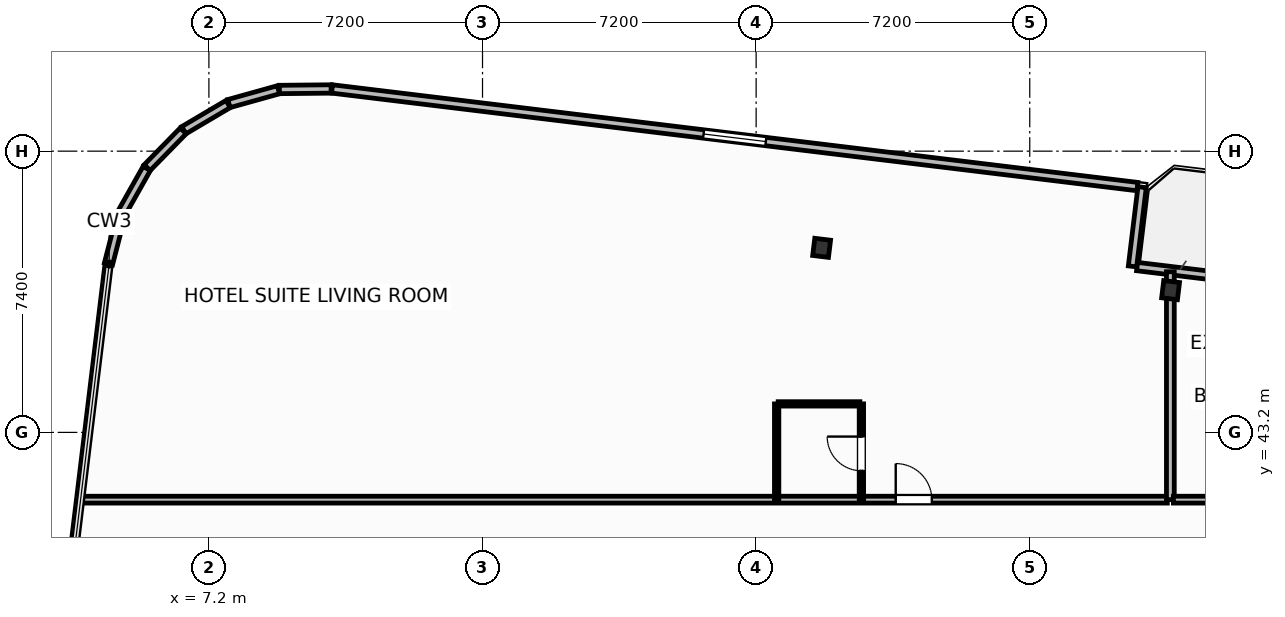
"""IFC4 building model, lengths in metres.
Left out: names, types, materials, properties, quantities, classifications, styles, units other than length and angle.
Written with IfcOpenShell. Run it as: python <this file> out.ifc"""

import sys

from ifc_helpers import new_model, si_unit, direction, frame, frame_2d, origin, origin_2d, place, context, subcontext, project, spatial, rectangle, i_section, extrude, element, fill, save


model = new_model("IFC4")
c1 = context("Model", 3, precision=1e-05, world=origin(), true_north=direction((0.0, 1.0)))
c2 = subcontext(c1, "Body", "Model", "MODEL_VIEW")
j1 = project(units=[si_unit("LENGTHUNIT", "METRE"), si_unit("PLANEANGLEUNIT", "RADIAN")], contexts=[c1])
p1 = place(None, origin())
s1 = spatial("IfcSite", under=j1, at=p1, CompositionType="ELEMENT")
p2 = place(p1, origin())
s2 = spatial("IfcBuilding", under=s1, at=p2, CompositionType="ELEMENT")
p3 = place(p2, frame((0.0, 0.0, 125.4)))
s3 = spatial("IfcBuildingStorey", under=s2, at=p3, CompositionType="ELEMENT", Elevation=125.4)
for number, where, z_axis, x_axis in (
    (1, (32.506, 46.943, 0.0), (0.0, 0.0, 1.0), (0.993, -0.12, 0.0)),
    (2, (23.323, 48.056, 0.0), (0.0, 0.0, 1.0), (0.993, -0.12, 0.0)),
):
    element("IfcColumn", number, at=place(p3, frame(where, z_axis=z_axis, x_axis=x_axis)), inside=s3, PredefinedType="COLUMN", context=c2, shape_type="SweptSolid", body=[
        extrude(i_section(OverallWidth=0.418, OverallDepth=0.455, WebThickness=0.042, FlangeThickness=0.068, FilletRadius=0.025, at=origin_2d()), origin(), (0.0, 0.0, 1.0), 3.7),
    ])
p4 = place(p3, frame((31.624, 47.563, 0.0), z_axis=(0.0, 0.0, 1.0), x_axis=(0.992729951822, -0.120362962556, 0.0)))
e3 = element("IfcWall", 3, at=p4, inside=s3, PredefinedType="SOLIDWALL", context=c2, shape_type="SweptSolid", body=[
    extrude(rectangle(XDim=6.0, YDim=0.22, at=frame_2d((3.0, 0.0))), origin(), (0.0, 0.0, 1.0), 2.73),
])
p5 = place(p4, frame((2.176, 0.0, 0.0)))
e4 = element("IfcOpeningElement", 4, at=p5, cuts=e3, PredefinedType="OPENING", context=c2, shape_type="SweptSolid", body=[
    extrude(rectangle(XDim=1.5, YDim=2.25, at=frame_2d((0.75, 1.125))), frame((0.0, 0.12, 0.0), z_axis=(0.0, -1.0, 0.0), x_axis=(1.0, 0.0, 0.0)), (0.0, 0.0, 1.0), 0.24),
])
p6 = place(p3, frame((31.504, 47.568, 0.0), z_axis=(0.0, 0.0, 1.0), x_axis=(0.120341784665, 0.992732519294, 0.0)))
e5 = element("IfcWall", 5, at=p6, inside=s3, PredefinedType="SOLIDWALL", context=c2, shape_type="SweptSolid", body=[
    extrude(rectangle(XDim=2.1, YDim=0.22, at=frame_2d((1.05, 0.0))), origin(), (0.0, 0.0, 1.0), 2.73),
])
p7 = place(p3, frame((31.633, 49.668, 0.0), z_axis=(0.0, 0.0, 1.0), x_axis=(-0.992731670483, 0.120348786531, 0.0)))
e6 = element("IfcWall", 6, at=p7, inside=s3, PredefinedType="SOLIDWALL", context=c2, shape_type="SweptSolid", body=[
    extrude(rectangle(XDim=21.347, YDim=0.22, at=frame_2d((10.674, 0.0))), origin(), (0.0, 0.0, 1.0), 2.73),
])
p8 = place(p7, frame((9.849, 0.0, 0.8)))
e7 = element("IfcOpeningElement", 7, at=p8, cuts=e6, PredefinedType="OPENING", context=c2, shape_type="SweptSolid", body=[
    extrude(rectangle(XDim=1.65, YDim=1.65, at=frame_2d((0.825, 0.825))), frame((0.0, 0.12, 0.0), z_axis=(0.0, -1.0, 0.0), x_axis=(1.0, 0.0, 0.0)), (0.0, 0.0, 1.0), 0.24),
])
p9 = place(p3, frame((10.416, 52.237, 0.0), z_axis=(0.0, 0.0, 1.0), x_axis=(-0.999947718056, -0.010225514878, 0.0)))
e8 = element("IfcWall", 8, at=p9, inside=s3, PredefinedType="SOLIDWALL", context=c2, shape_type="SweptSolid", body=[
    extrude(rectangle(XDim=1.361, YDim=0.22, at=frame_2d((0.68, 0.0))), origin(), (0.0, 0.0, 1.0), 2.73),
])
for number, where, z_axis, x_axis in (
    (9, (9.031, 52.216, 0.0), (0.0, 0.0, 1.0), (-0.963, -0.269, 0.0)),
    (10, (7.706, 51.84, 0.0), (0.0, 0.0, 1.0), (-0.861, -0.509, 0.0)),
):
    element("IfcWall", number, at=place(p3, frame(where, z_axis=z_axis, x_axis=x_axis)), inside=s3, PredefinedType="SOLIDWALL", context=c2, shape_type="SweptSolid", body=[
        extrude(rectangle(XDim=1.353, YDim=0.22, at=frame_2d((0.677, 0.0))), origin(), (0.0, 0.0, 1.0), 2.73),
    ])
p10 = place(p3, frame((6.523, 51.133, 0.0), z_axis=(0.0, 0.0, 1.0), x_axis=(-0.699762925925, -0.714375144795, 0.0)))
e11 = element("IfcWall", 11, at=p10, inside=s3, PredefinedType="SOLIDWALL", context=c2, shape_type="SweptSolid", body=[
    extrude(rectangle(XDim=1.353, YDim=0.22, at=frame_2d((0.677, 0.0))), origin(), (0.0, 0.0, 1.0), 2.73),
])
p11 = place(p3, frame((5.564, 50.145, 0.0), z_axis=(0.0, 0.0, 1.0), x_axis=(-0.491117621399, -0.871093268227, 0.0)))
e12 = element("IfcWall", 12, at=p11, inside=s3, PredefinedType="SOLIDWALL", context=c2, shape_type="SweptSolid", body=[
    extrude(rectangle(XDim=1.353, YDim=0.22, at=frame_2d((0.677, 0.0))), origin(), (0.0, 0.0, 1.0), 2.73),
])
p12 = place(p3, frame((4.894, 48.942, 0.0), z_axis=(0.0, 0.0, 1.0), x_axis=(-0.248857256909, -0.968540172468, 0.0)))
e13 = element("IfcWall", 13, at=p12, inside=s3, PredefinedType="SOLIDWALL", context=c2, shape_type="SweptSolid", body=[
    extrude(rectangle(XDim=1.353, YDim=0.22, at=frame_2d((0.676, 0.0))), origin(), (0.0, 0.0, 1.0), 2.73),
])
p13 = place(p3, frame((3.864, 41.43, 0.0), z_axis=(0.0, 0.0, 1.0), x_axis=(1.0, 0.0, 0.0)))
e14 = element("IfcWall", 14, at=p13, inside=s3, PredefinedType="PARTITIONING", context=c2, shape_type="SweptSolid", body=[
    extrude(rectangle(XDim=28.556, YDim=0.18, at=frame_2d((14.278, 0.0))), origin(), (0.0, 0.0, 1.0), 3.45),
])
p14 = place(p13, frame((21.409, 0.0, 0.0)))
e15 = element("IfcOpeningElement", 15, at=p14, cuts=e14, PredefinedType="OPENING", context=c2, shape_type="SweptSolid", body=[
    extrude(rectangle(XDim=0.95, YDim=2.15, at=frame_2d((0.475, 1.075))), frame((0.0, 0.1, 0.0), z_axis=(0.0, -1.0, 0.0), x_axis=(1.0, 0.0, 0.0)), (0.0, 0.0, 1.0), 0.2),
])
p15 = place(p3, frame((22.18, 43.95, 0.0), z_axis=(0.0, 0.0, 1.0), x_axis=(1.0, 0.0, 0.0)))
e16 = element("IfcWall", 16, at=p15, inside=s3, PredefinedType="PARTITIONING", context=c2, shape_type="SweptSolid", body=[
    extrude(rectangle(XDim=2.15, YDim=0.115, at=frame_2d((1.075, 0.0))), origin(), (0.0, 0.0, 1.0), 3.45),
])
p16 = place(p3, frame((24.37, 41.43, 0.0), z_axis=(0.0, 0.0, 1.0), x_axis=(0.0, 1.0, 0.0)))
e17 = element("IfcWall", 17, at=p16, inside=s3, PredefinedType="PARTITIONING", context=c2, shape_type="SweptSolid", body=[
    extrude(rectangle(XDim=2.52, YDim=0.115, at=frame_2d((1.26, 0.0))), origin(), (0.0, 0.0, 1.0), 3.45),
])
p17 = place(p16, frame((0.76, 0.0, 0.0)))
e18 = element("IfcOpeningElement", 18, at=p17, cuts=e17, PredefinedType="OPENING", context=c2, shape_type="SweptSolid", body=[
    extrude(rectangle(XDim=0.9, YDim=2.05, at=frame_2d((0.45, 1.025))), frame((0.0, 0.067, 0.0), z_axis=(0.0, -1.0, 0.0), x_axis=(1.0, 0.0, 0.0)), (0.0, 0.0, 1.0), 0.135),
])
p18 = place(p3, frame((22.14, 41.43, 0.0), z_axis=(0.0, 0.0, 1.0), x_axis=(0.0, 1.0, 0.0)))
e19 = element("IfcWall", 19, at=p18, inside=s3, PredefinedType="PARTITIONING", context=c2, shape_type="SweptSolid", body=[
    extrude(rectangle(XDim=2.52, YDim=0.115, at=frame_2d((1.26, 0.0))), origin(), (0.0, 0.0, 1.0), 3.45),
])
p19 = place(p3, frame((32.5, 41.43, 0.0), z_axis=(0.0, 0.0, 1.0), x_axis=(0.0, 1.0, 0.0)))
e20 = element("IfcWall", 20, at=p19, inside=s3, PredefinedType="PARTITIONING", context=c2, shape_type="SweptSolid", body=[
    extrude(rectangle(XDim=5.997, YDim=0.205, at=frame_2d((2.999, 0.0))), origin(), (0.0, 0.0, 1.0), 2.662),
])
p20 = place(p3, frame((32.58, 41.43, 0.0), z_axis=(0.0, 0.0, 1.0), x_axis=(1.0, 0.0, 0.0)))
e21 = element("IfcWall", 21, at=p20, inside=s3, PredefinedType="PARTITIONING", context=c2, shape_type="SweptSolid", body=[
    extrude(rectangle(XDim=9.84, YDim=0.18, at=frame_2d((4.92, 0.0))), origin(), (0.0, 0.0, 1.0), 3.45),
])
p21 = place(p20, frame((5.68, 0.0, 0.0)))
e22 = element("IfcOpeningElement", 22, at=p21, cuts=e21, PredefinedType="OPENING", context=c2, shape_type="SweptSolid", body=[
    extrude(rectangle(XDim=0.95, YDim=2.15, at=frame_2d((0.475, 1.075))), frame((0.0, 0.1, 0.0), z_axis=(0.0, -1.0, 0.0), x_axis=(1.0, 0.0, 0.0)), (0.0, 0.0, 1.0), 0.2),
])
p22 = place(p8, origin())
e23 = element("IfcWindow", 23, at=p22, inside=s3, PartitioningType="SINGLE_PANEL", PredefinedType="WINDOW", context=c2, shape_type="SweptSolid", body=[
    extrude(rectangle(XDim=1.65, YDim=1.65, at=frame_2d((0.825, 0.825))), frame((0.0, 0.03, 0.0), z_axis=(0.0, -1.0, 0.0), x_axis=(1.0, 0.0, 0.0)), (0.0, 0.0, 1.0), 0.06),
])
fill(e7, e23)
p23 = place(p14, origin())
e24 = element("IfcDoor", 24, at=p23, inside=s3, OperationType="SINGLE_SWING_LEFT", PredefinedType="DOOR", context=c2, shape_type="SweptSolid", body=[
    extrude(rectangle(XDim=0.95, YDim=2.15, at=frame_2d((0.475, 1.075))), frame((0.0, 0.025, 0.0), z_axis=(0.0, -1.0, 0.0), x_axis=(1.0, 0.0, 0.0)), (0.0, 0.0, 1.0), 0.05),
])
fill(e15, e24)
p24 = place(p17, origin())
e25 = element("IfcDoor", 25, at=p24, inside=s3, OperationType="SINGLE_SWING_RIGHT", PredefinedType="DOOR", context=c2, shape_type="SweptSolid", body=[
    extrude(rectangle(XDim=0.9, YDim=2.05, at=frame_2d((0.45, 1.025))), frame((0.0, 0.025, 0.0), z_axis=(0.0, -1.0, 0.0), x_axis=(1.0, 0.0, 0.0)), (0.0, 0.0, 1.0), 0.05),
])
fill(e18, e25)
save(model, sys.argv[1])
